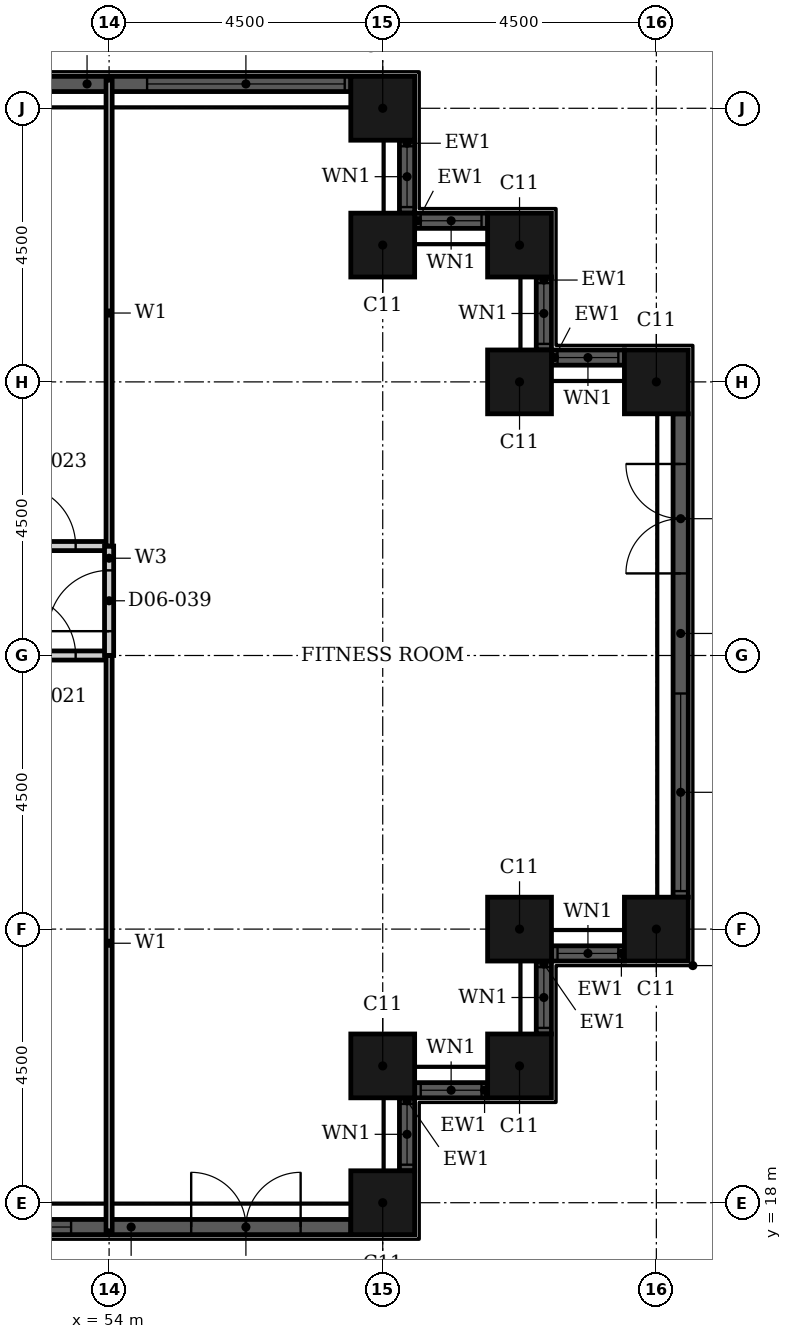
"""IFC4 building model, lengths in metres.
Left out: names, types, materials, properties, quantities, classifications, styles, units other than length and angle.
Written with IfcOpenShell. Run it as: python <this file> out.ifc"""

import sys

from ifc_helpers import new_model, si_unit, direction, frame, frame_2d, origin, origin_2d, place, context, subcontext, project, spatial, rectangle, hollow_rectangle, extrude, element, fill, save


model = new_model("IFC4")
c1 = context("Model", 3, precision=1e-05, world=origin(), true_north=direction((0.0, 1.0)))
c2 = subcontext(c1, "Body", "Model", "MODEL_VIEW")
j1 = project(units=[si_unit("LENGTHUNIT", "METRE"), si_unit("PLANEANGLEUNIT", "RADIAN")], contexts=[c1])
p1 = place(None, origin())
s1 = spatial("IfcSite", under=j1, at=p1, CompositionType="ELEMENT")
p2 = place(p1, origin())
s2 = spatial("IfcBuilding", under=s1, at=p2, CompositionType="ELEMENT")
p3 = place(p2, frame((0.0, 0.0, 33.6)))
s3 = spatial("IfcBuildingStorey", under=s2, at=p3, CompositionType="ELEMENT", Elevation=33.6)
for number, where, z_axis, x_axis in (
    (1, (58.5, 18.0, 0.0), (0.0, 0.0, 1.0), (1.0, 0.0, 0.0)),
    (2, (58.5, 20.25, 0.0), (0.0, 0.0, 1.0), (1.0, 0.0, 0.0)),
    (3, (60.75, 20.25, 0.0), (0.0, 0.0, 1.0), (1.0, 0.0, 0.0)),
    (4, (60.75, 22.5, 0.0), (0.0, 0.0, 1.0), (1.0, 0.0, 0.0)),
    (5, (63.0, 22.5, 0.0), (0.0, 0.0, 1.0), (1.0, 0.0, 0.0)),
    (6, (63.0, 31.5, 0.0), (0.0, 0.0, 1.0), (1.0, 0.0, 0.0)),
    (7, (60.75, 31.5, 0.0), (0.0, 0.0, 1.0), (1.0, 0.0, 0.0)),
    (8, (60.75, 33.75, 0.0), (0.0, 0.0, 1.0), (1.0, 0.0, 0.0)),
    (9, (58.5, 33.75, 0.0), (0.0, 0.0, 1.0), (1.0, 0.0, 0.0)),
    (10, (58.5, 36.0, 0.0), (0.0, 0.0, 1.0), (1.0, 0.0, 0.0)),
):
    element("IfcColumn", number, at=place(p3, frame(where, z_axis=z_axis, x_axis=x_axis)), inside=s3, PredefinedType="COLUMN", context=c2, shape_type="SweptSolid", body=[
        extrude(hollow_rectangle(XDim=1.05, YDim=1.05, WallThickness=0.034, at=origin_2d()), origin(), (0.0, 0.0, 1.0), 3.6),
    ])
p4 = place(p3, frame((50.025, 17.6, 0.0), z_axis=(0.0, 0.0, 1.0), x_axis=(1.0, 0.0, 0.0)))
e11 = element("IfcWall", 11, at=p4, inside=s3, PredefinedType="SOLIDWALL", context=c2, shape_type="SweptSolid", body=[
    extrude(rectangle(XDim=7.95, YDim=0.25, at=frame_2d((3.975, 0.0))), origin(), (0.0, 0.0, 1.0), 3.6),
])
p5 = place(p4, frame((0.1, 0.0, 0.9)))
e12 = element("IfcOpeningElement", 12, at=p5, cuts=e11, PredefinedType="OPENING", context=c2, shape_type="SweptSolid", body=[
    extrude(rectangle(XDim=3.25, YDim=2.08, at=frame_2d((1.625, 1.04))), frame((0.0, 0.135, 0.0), z_axis=(0.0, -1.0, 0.0), x_axis=(1.0, 0.0, 0.0)), (0.0, 0.0, 1.0), 0.27),
])
p6 = place(p4, frame((5.325, 0.0, 0.0)))
e13 = element("IfcOpeningElement", 13, at=p6, cuts=e11, PredefinedType="OPENING", context=c2, shape_type="SweptSolid", body=[
    extrude(rectangle(XDim=1.8, YDim=2.4, at=frame_2d((0.9, 1.2))), frame((0.0, 0.135, 0.0), z_axis=(0.0, -1.0, 0.0), x_axis=(1.0, 0.0, 0.0)), (0.0, 0.0, 1.0), 0.27),
])
p7 = place(p3, frame((58.9, 18.525, 0.0), z_axis=(0.0, 0.0, 1.0), x_axis=(0.0, 1.0, 0.0)))
e14 = element("IfcWall", 14, at=p7, inside=s3, PredefinedType="SOLIDWALL", context=c2, shape_type="SweptSolid", body=[
    extrude(rectangle(XDim=1.2, YDim=0.25, at=frame_2d((0.6, 0.0))), origin(), (0.0, 0.0, 1.0), 3.6),
])
p8 = place(p7, frame((0.1, 0.0, 0.9)))
e15 = element("IfcOpeningElement", 15, at=p8, cuts=e14, PredefinedType="OPENING", context=c2, shape_type="SweptSolid", body=[
    extrude(rectangle(XDim=1.0, YDim=2.08, at=frame_2d((0.5, 1.04))), frame((0.0, 0.135, 0.0), z_axis=(0.0, -1.0, 0.0), x_axis=(1.0, 0.0, 0.0)), (0.0, 0.0, 1.0), 0.27),
])
p9 = place(p3, frame((59.025, 19.85, 0.0), z_axis=(0.0, 0.0, 1.0), x_axis=(1.0, 0.0, 0.0)))
e16 = element("IfcWall", 16, at=p9, inside=s3, PredefinedType="SOLIDWALL", context=c2, shape_type="SweptSolid", body=[
    extrude(rectangle(XDim=1.2, YDim=0.25, at=frame_2d((0.6, 0.0))), origin(), (0.0, 0.0, 1.0), 3.6),
])
p10 = place(p9, frame((0.1, 0.0, 0.9)))
e17 = element("IfcOpeningElement", 17, at=p10, cuts=e16, PredefinedType="OPENING", context=c2, shape_type="SweptSolid", body=[
    extrude(rectangle(XDim=1.0, YDim=2.08, at=frame_2d((0.5, 1.04))), frame((0.0, 0.135, 0.0), z_axis=(0.0, -1.0, 0.0), x_axis=(1.0, 0.0, 0.0)), (0.0, 0.0, 1.0), 0.27),
])
p11 = place(p3, frame((61.15, 20.775, 0.0), z_axis=(0.0, 0.0, 1.0), x_axis=(0.0, 1.0, 0.0)))
e18 = element("IfcWall", 18, at=p11, inside=s3, PredefinedType="SOLIDWALL", context=c2, shape_type="SweptSolid", body=[
    extrude(rectangle(XDim=1.2, YDim=0.25, at=frame_2d((0.6, 0.0))), origin(), (0.0, 0.0, 1.0), 3.6),
])
p12 = place(p11, frame((0.1, 0.0, 0.9)))
e19 = element("IfcOpeningElement", 19, at=p12, cuts=e18, PredefinedType="OPENING", context=c2, shape_type="SweptSolid", body=[
    extrude(rectangle(XDim=1.0, YDim=2.08, at=frame_2d((0.5, 1.04))), frame((0.0, 0.135, 0.0), z_axis=(0.0, -1.0, 0.0), x_axis=(1.0, 0.0, 0.0)), (0.0, 0.0, 1.0), 0.27),
])
p13 = place(p3, frame((61.275, 22.1, 0.0), z_axis=(0.0, 0.0, 1.0), x_axis=(1.0, 0.0, 0.0)))
e20 = element("IfcWall", 20, at=p13, inside=s3, PredefinedType="SOLIDWALL", context=c2, shape_type="SweptSolid", body=[
    extrude(rectangle(XDim=1.2, YDim=0.25, at=frame_2d((0.6, 0.0))), origin(), (0.0, 0.0, 1.0), 3.6),
])
p14 = place(p13, frame((0.1, 0.0, 0.9)))
e21 = element("IfcOpeningElement", 21, at=p14, cuts=e20, PredefinedType="OPENING", context=c2, shape_type="SweptSolid", body=[
    extrude(rectangle(XDim=1.0, YDim=2.08, at=frame_2d((0.5, 1.04))), frame((0.0, 0.135, 0.0), z_axis=(0.0, -1.0, 0.0), x_axis=(1.0, 0.0, 0.0)), (0.0, 0.0, 1.0), 0.27),
])
p15 = place(p3, frame((63.4, 23.025, 0.0), z_axis=(0.0, 0.0, 1.0), x_axis=(0.0, 1.0, 0.0)))
e22 = element("IfcWall", 22, at=p15, inside=s3, PredefinedType="SOLIDWALL", context=c2, shape_type="SweptSolid", body=[
    extrude(rectangle(XDim=7.95, YDim=0.25, at=frame_2d((3.975, 0.0))), origin(), (0.0, 0.0, 1.0), 3.6),
])
p16 = place(p15, frame((0.1, 0.0, 0.9)))
e23 = element("IfcOpeningElement", 23, at=p16, cuts=e22, PredefinedType="OPENING", context=c2, shape_type="SweptSolid", body=[
    extrude(rectangle(XDim=3.25, YDim=2.08, at=frame_2d((1.625, 1.04))), frame((0.0, 0.135, 0.0), z_axis=(0.0, -1.0, 0.0), x_axis=(1.0, 0.0, 0.0)), (0.0, 0.0, 1.0), 0.27),
])
p17 = place(p15, frame((5.325, 0.0, 0.0)))
e24 = element("IfcOpeningElement", 24, at=p17, cuts=e22, PredefinedType="OPENING", context=c2, shape_type="SweptSolid", body=[
    extrude(rectangle(XDim=1.8, YDim=2.4, at=frame_2d((0.9, 1.2))), frame((0.0, 0.135, 0.0), z_axis=(0.0, -1.0, 0.0), x_axis=(1.0, 0.0, 0.0)), (0.0, 0.0, 1.0), 0.27),
])
p18 = place(p3, frame((62.475, 31.9, 0.0), z_axis=(0.0, 0.0, 1.0), x_axis=(-1.0, 0.0, 0.0)))
e25 = element("IfcWall", 25, at=p18, inside=s3, PredefinedType="SOLIDWALL", context=c2, shape_type="SweptSolid", body=[
    extrude(rectangle(XDim=1.2, YDim=0.25, at=frame_2d((0.6, 0.0))), origin(), (0.0, 0.0, 1.0), 3.6),
])
p19 = place(p18, frame((0.1, 0.0, 0.9)))
e26 = element("IfcOpeningElement", 26, at=p19, cuts=e25, PredefinedType="OPENING", context=c2, shape_type="SweptSolid", body=[
    extrude(rectangle(XDim=1.0, YDim=2.08, at=frame_2d((0.5, 1.04))), frame((0.0, 0.135, 0.0), z_axis=(0.0, -1.0, 0.0), x_axis=(1.0, 0.0, 0.0)), (0.0, 0.0, 1.0), 0.27),
])
p20 = place(p3, frame((61.15, 32.025, 0.0), z_axis=(0.0, 0.0, 1.0), x_axis=(0.0, 1.0, 0.0)))
e27 = element("IfcWall", 27, at=p20, inside=s3, PredefinedType="SOLIDWALL", context=c2, shape_type="SweptSolid", body=[
    extrude(rectangle(XDim=1.2, YDim=0.25, at=frame_2d((0.6, 0.0))), origin(), (0.0, 0.0, 1.0), 3.6),
])
p21 = place(p20, frame((0.1, 0.0, 0.9)))
e28 = element("IfcOpeningElement", 28, at=p21, cuts=e27, PredefinedType="OPENING", context=c2, shape_type="SweptSolid", body=[
    extrude(rectangle(XDim=1.0, YDim=2.08, at=frame_2d((0.5, 1.04))), frame((0.0, 0.135, 0.0), z_axis=(0.0, -1.0, 0.0), x_axis=(1.0, 0.0, 0.0)), (0.0, 0.0, 1.0), 0.27),
])
p22 = place(p3, frame((60.225, 34.15, 0.0), z_axis=(0.0, 0.0, 1.0), x_axis=(-1.0, 0.0, 0.0)))
e29 = element("IfcWall", 29, at=p22, inside=s3, PredefinedType="SOLIDWALL", context=c2, shape_type="SweptSolid", body=[
    extrude(rectangle(XDim=1.2, YDim=0.25, at=frame_2d((0.6, 0.0))), origin(), (0.0, 0.0, 1.0), 3.6),
])
p23 = place(p22, frame((0.1, 0.0, 0.9)))
e30 = element("IfcOpeningElement", 30, at=p23, cuts=e29, PredefinedType="OPENING", context=c2, shape_type="SweptSolid", body=[
    extrude(rectangle(XDim=1.0, YDim=2.08, at=frame_2d((0.5, 1.04))), frame((0.0, 0.135, 0.0), z_axis=(0.0, -1.0, 0.0), x_axis=(1.0, 0.0, 0.0)), (0.0, 0.0, 1.0), 0.27),
])
p24 = place(p3, frame((58.9, 34.275, 0.0), z_axis=(0.0, 0.0, 1.0), x_axis=(0.0, 1.0, 0.0)))
e31 = element("IfcWall", 31, at=p24, inside=s3, PredefinedType="SOLIDWALL", context=c2, shape_type="SweptSolid", body=[
    extrude(rectangle(XDim=1.2, YDim=0.25, at=frame_2d((0.6, 0.0))), origin(), (0.0, 0.0, 1.0), 3.6),
])
p25 = place(p24, frame((0.1, 0.0, 0.9)))
e32 = element("IfcOpeningElement", 32, at=p25, cuts=e31, PredefinedType="OPENING", context=c2, shape_type="SweptSolid", body=[
    extrude(rectangle(XDim=1.0, YDim=2.08, at=frame_2d((0.5, 1.04))), frame((0.0, 0.135, 0.0), z_axis=(0.0, -1.0, 0.0), x_axis=(1.0, 0.0, 0.0)), (0.0, 0.0, 1.0), 0.27),
])
p26 = place(p3, frame((57.975, 36.4, 0.0), z_axis=(0.0, 0.0, 1.0), x_axis=(-1.0, 0.0, 0.0)))
e33 = element("IfcWall", 33, at=p26, inside=s3, PredefinedType="SOLIDWALL", context=c2, shape_type="SweptSolid", body=[
    extrude(rectangle(XDim=7.95, YDim=0.25, at=frame_2d((3.975, 0.0))), origin(), (0.0, 0.0, 1.0), 3.6),
])
p27 = place(p26, frame((0.1, 0.0, 0.9)))
e34 = element("IfcOpeningElement", 34, at=p27, cuts=e33, PredefinedType="OPENING", context=c2, shape_type="SweptSolid", body=[
    extrude(rectangle(XDim=3.25, YDim=2.08, at=frame_2d((1.625, 1.04))), frame((0.0, 0.135, 0.0), z_axis=(0.0, -1.0, 0.0), x_axis=(1.0, 0.0, 0.0)), (0.0, 0.0, 1.0), 0.27),
])
p28 = place(p26, frame((5.325, 0.0, 0.0)))
e35 = element("IfcOpeningElement", 35, at=p28, cuts=e33, PredefinedType="OPENING", context=c2, shape_type="SweptSolid", body=[
    extrude(rectangle(XDim=1.8, YDim=2.4, at=frame_2d((0.9, 1.2))), frame((0.0, 0.135, 0.0), z_axis=(0.0, -1.0, 0.0), x_axis=(1.0, 0.0, 0.0)), (0.0, 0.0, 1.0), 0.27),
])
p29 = place(p3, frame((46.8, 27.0, 0.0), z_axis=(0.0, 0.0, 1.0), x_axis=(1.0, 0.0, 0.0)))
e36 = element("IfcWall", 36, at=p29, inside=s3, PredefinedType="PARTITIONING", context=c2, shape_type="SweptSolid", body=[
    extrude(rectangle(XDim=7.2, YDim=0.15, at=frame_2d((3.6, 0.0))), origin(), (0.0, 0.0, 1.0), 2.58),
])
p30 = place(p29, frame((5.65, 0.0, 0.0)))
e37 = element("IfcOpeningElement", 37, at=p30, cuts=e36, PredefinedType="OPENING", context=c2, shape_type="SweptSolid", body=[
    extrude(rectangle(XDim=1.0, YDim=2.1, at=frame_2d((0.5, 1.05))), frame((0.0, 0.085, 0.0), z_axis=(0.0, -1.0, 0.0), x_axis=(1.0, 0.0, 0.0)), (0.0, 0.0, 1.0), 0.17),
])
p31 = place(p3, frame((46.8, 28.8, 0.0), z_axis=(0.0, 0.0, 1.0), x_axis=(1.0, 0.0, 0.0)))
e38 = element("IfcWall", 38, at=p31, inside=s3, PredefinedType="PARTITIONING", context=c2, shape_type="SweptSolid", body=[
    extrude(rectangle(XDim=7.2, YDim=0.15, at=frame_2d((3.6, 0.0))), origin(), (0.0, 0.0, 1.0), 3.3),
])
p32 = place(p31, frame((5.65, 0.0, 0.0)))
e39 = element("IfcOpeningElement", 39, at=p32, cuts=e38, PredefinedType="OPENING", context=c2, shape_type="SweptSolid", body=[
    extrude(rectangle(XDim=1.0, YDim=2.1, at=frame_2d((0.5, 1.05))), frame((0.0, 0.085, 0.0), z_axis=(0.0, -1.0, 0.0), x_axis=(1.0, 0.0, 0.0)), (0.0, 0.0, 1.0), 0.17),
])
p33 = place(p3, frame((54.0, 27.0, 0.0), z_axis=(0.0, 0.0, 1.0), x_axis=(0.0, 1.0, 0.0)))
e40 = element("IfcWall", 40, at=p33, inside=s3, PredefinedType="PARTITIONING", context=c2, shape_type="SweptSolid", body=[
    extrude(rectangle(XDim=1.8, YDim=0.15, at=frame_2d((0.9, 0.0))), origin(), (0.0, 0.0, 1.0), 3.3),
])
p34 = place(p33, frame((0.4, 0.0, 0.0)))
e41 = element("IfcOpeningElement", 41, at=p34, cuts=e40, PredefinedType="OPENING", context=c2, shape_type="SweptSolid", body=[
    extrude(rectangle(XDim=1.0, YDim=2.1, at=frame_2d((0.5, 1.05))), frame((0.0, 0.085, 0.0), z_axis=(0.0, -1.0, 0.0), x_axis=(1.0, 0.0, 0.0)), (0.0, 0.0, 1.0), 0.17),
])
p35 = place(p3, frame((54.0, 28.8, 0.0), z_axis=(0.0, 0.0, 1.0), x_axis=(0.0, 1.0, 0.0)))
e42 = element("IfcWall", 42, at=p35, inside=s3, PredefinedType="PARTITIONING", context=c2, shape_type="SweptSolid", body=[
    extrude(rectangle(XDim=7.665, YDim=0.1, at=frame_2d((3.833, 0.0))), origin(), (0.0, 0.0, 1.0), 3.3),
])
p36 = place(p3, frame((54.0, 17.535, 0.0), z_axis=(0.0, 0.0, 1.0), x_axis=(0.0, 1.0, 0.0)))
e43 = element("IfcWall", 43, at=p36, inside=s3, PredefinedType="PARTITIONING", context=c2, shape_type="SweptSolid", body=[
    extrude(rectangle(XDim=9.465, YDim=0.1, at=frame_2d((4.732, 0.0))), origin(), (0.0, 0.0, 1.0), 3.3),
])
p37 = place(p5, origin())
e44 = element("IfcWindow", 44, at=p37, inside=s3, PartitioningType="SINGLE_PANEL", PredefinedType="WINDOW", context=c2, shape_type="SweptSolid", body=[
    extrude(rectangle(XDim=3.25, YDim=2.08, at=frame_2d((1.625, 1.04))), frame((0.0, 0.03, 0.0), z_axis=(0.0, -1.0, 0.0), x_axis=(1.0, 0.0, 0.0)), (0.0, 0.0, 1.0), 0.06),
])
fill(e12, e44)
p38 = place(p6, origin())
e45 = element("IfcDoor", 45, at=p38, inside=s3, OperationType="DOUBLE_DOOR_SINGLE_SWING", PredefinedType="DOOR", context=c2, shape_type="SweptSolid", body=[
    extrude(rectangle(XDim=1.8, YDim=2.4, at=frame_2d((0.9, 1.2))), frame((0.0, 0.025, 0.0), z_axis=(0.0, -1.0, 0.0), x_axis=(1.0, 0.0, 0.0)), (0.0, 0.0, 1.0), 0.05),
])
fill(e13, e45)
p39 = place(p8, origin())
e46 = element("IfcWindow", 46, at=p39, inside=s3, PartitioningType="SINGLE_PANEL", PredefinedType="WINDOW", context=c2, shape_type="SweptSolid", body=[
    extrude(rectangle(XDim=1.0, YDim=2.08, at=frame_2d((0.5, 1.04))), frame((0.0, 0.03, 0.0), z_axis=(0.0, -1.0, 0.0), x_axis=(1.0, 0.0, 0.0)), (0.0, 0.0, 1.0), 0.06),
])
fill(e15, e46)
p40 = place(p10, origin())
e47 = element("IfcWindow", 47, at=p40, inside=s3, PartitioningType="SINGLE_PANEL", PredefinedType="WINDOW", context=c2, shape_type="SweptSolid", body=[
    extrude(rectangle(XDim=1.0, YDim=2.08, at=frame_2d((0.5, 1.04))), frame((0.0, 0.03, 0.0), z_axis=(0.0, -1.0, 0.0), x_axis=(1.0, 0.0, 0.0)), (0.0, 0.0, 1.0), 0.06),
])
fill(e17, e47)
p41 = place(p12, origin())
e48 = element("IfcWindow", 48, at=p41, inside=s3, PartitioningType="SINGLE_PANEL", PredefinedType="WINDOW", context=c2, shape_type="SweptSolid", body=[
    extrude(rectangle(XDim=1.0, YDim=2.08, at=frame_2d((0.5, 1.04))), frame((0.0, 0.03, 0.0), z_axis=(0.0, -1.0, 0.0), x_axis=(1.0, 0.0, 0.0)), (0.0, 0.0, 1.0), 0.06),
])
fill(e19, e48)
p42 = place(p14, origin())
e49 = element("IfcWindow", 49, at=p42, inside=s3, PartitioningType="SINGLE_PANEL", PredefinedType="WINDOW", context=c2, shape_type="SweptSolid", body=[
    extrude(rectangle(XDim=1.0, YDim=2.08, at=frame_2d((0.5, 1.04))), frame((0.0, 0.03, 0.0), z_axis=(0.0, -1.0, 0.0), x_axis=(1.0, 0.0, 0.0)), (0.0, 0.0, 1.0), 0.06),
])
fill(e21, e49)
p43 = place(p16, origin())
e50 = element("IfcWindow", 50, at=p43, inside=s3, PartitioningType="SINGLE_PANEL", PredefinedType="WINDOW", context=c2, shape_type="SweptSolid", body=[
    extrude(rectangle(XDim=3.25, YDim=2.08, at=frame_2d((1.625, 1.04))), frame((0.0, 0.03, 0.0), z_axis=(0.0, -1.0, 0.0), x_axis=(1.0, 0.0, 0.0)), (0.0, 0.0, 1.0), 0.06),
])
fill(e23, e50)
p44 = place(p17, origin())
e51 = element("IfcDoor", 51, at=p44, inside=s3, OperationType="DOUBLE_DOOR_SINGLE_SWING", PredefinedType="DOOR", context=c2, shape_type="SweptSolid", body=[
    extrude(rectangle(XDim=1.8, YDim=2.4, at=frame_2d((0.9, 1.2))), frame((0.0, 0.025, 0.0), z_axis=(0.0, -1.0, 0.0), x_axis=(1.0, 0.0, 0.0)), (0.0, 0.0, 1.0), 0.05),
])
fill(e24, e51)
p45 = place(p19, origin())
e52 = element("IfcWindow", 52, at=p45, inside=s3, PartitioningType="SINGLE_PANEL", PredefinedType="WINDOW", context=c2, shape_type="SweptSolid", body=[
    extrude(rectangle(XDim=1.0, YDim=2.08, at=frame_2d((0.5, 1.04))), frame((0.0, 0.03, 0.0), z_axis=(0.0, -1.0, 0.0), x_axis=(1.0, 0.0, 0.0)), (0.0, 0.0, 1.0), 0.06),
])
fill(e26, e52)
p46 = place(p21, origin())
e53 = element("IfcWindow", 53, at=p46, inside=s3, PartitioningType="SINGLE_PANEL", PredefinedType="WINDOW", context=c2, shape_type="SweptSolid", body=[
    extrude(rectangle(XDim=1.0, YDim=2.08, at=frame_2d((0.5, 1.04))), frame((0.0, 0.03, 0.0), z_axis=(0.0, -1.0, 0.0), x_axis=(1.0, 0.0, 0.0)), (0.0, 0.0, 1.0), 0.06),
])
fill(e28, e53)
p47 = place(p23, origin())
e54 = element("IfcWindow", 54, at=p47, inside=s3, PartitioningType="SINGLE_PANEL", PredefinedType="WINDOW", context=c2, shape_type="SweptSolid", body=[
    extrude(rectangle(XDim=1.0, YDim=2.08, at=frame_2d((0.5, 1.04))), frame((0.0, 0.03, 0.0), z_axis=(0.0, -1.0, 0.0), x_axis=(1.0, 0.0, 0.0)), (0.0, 0.0, 1.0), 0.06),
])
fill(e30, e54)
p48 = place(p25, origin())
e55 = element("IfcWindow", 55, at=p48, inside=s3, PartitioningType="SINGLE_PANEL", PredefinedType="WINDOW", context=c2, shape_type="SweptSolid", body=[
    extrude(rectangle(XDim=1.0, YDim=2.08, at=frame_2d((0.5, 1.04))), frame((0.0, 0.03, 0.0), z_axis=(0.0, -1.0, 0.0), x_axis=(1.0, 0.0, 0.0)), (0.0, 0.0, 1.0), 0.06),
])
fill(e32, e55)
p49 = place(p27, origin())
e56 = element("IfcWindow", 56, at=p49, inside=s3, PartitioningType="SINGLE_PANEL", PredefinedType="WINDOW", context=c2, shape_type="SweptSolid", body=[
    extrude(rectangle(XDim=3.25, YDim=2.08, at=frame_2d((1.625, 1.04))), frame((0.0, 0.03, 0.0), z_axis=(0.0, -1.0, 0.0), x_axis=(1.0, 0.0, 0.0)), (0.0, 0.0, 1.0), 0.06),
])
fill(e34, e56)
p50 = place(p30, origin())
e57 = element("IfcDoor", 57, at=p50, inside=s3, OperationType="SINGLE_SWING_RIGHT", PredefinedType="DOOR", context=c2, shape_type="SweptSolid", body=[
    extrude(rectangle(XDim=1.0, YDim=2.1, at=frame_2d((0.5, 1.05))), frame((0.0, 0.025, 0.0), z_axis=(0.0, -1.0, 0.0), x_axis=(1.0, 0.0, 0.0)), (0.0, 0.0, 1.0), 0.05),
])
fill(e37, e57)
p51 = place(p32, origin())
e58 = element("IfcDoor", 58, at=p51, inside=s3, OperationType="SINGLE_SWING_RIGHT", PredefinedType="DOOR", context=c2, shape_type="SweptSolid", body=[
    extrude(rectangle(XDim=1.0, YDim=2.1, at=frame_2d((0.5, 1.05))), frame((0.0, 0.025, 0.0), z_axis=(0.0, -1.0, 0.0), x_axis=(1.0, 0.0, 0.0)), (0.0, 0.0, 1.0), 0.05),
])
fill(e39, e58)
p52 = place(p34, origin())
e59 = element("IfcDoor", 59, at=p52, inside=s3, OperationType="SINGLE_SWING_LEFT", PredefinedType="DOOR", context=c2, shape_type="SweptSolid", body=[
    extrude(rectangle(XDim=1.0, YDim=2.1, at=frame_2d((0.5, 1.05))), frame((0.0, 0.025, 0.0), z_axis=(0.0, -1.0, 0.0), x_axis=(1.0, 0.0, 0.0)), (0.0, 0.0, 1.0), 0.05),
])
fill(e41, e59)
save(model, sys.argv[1])
